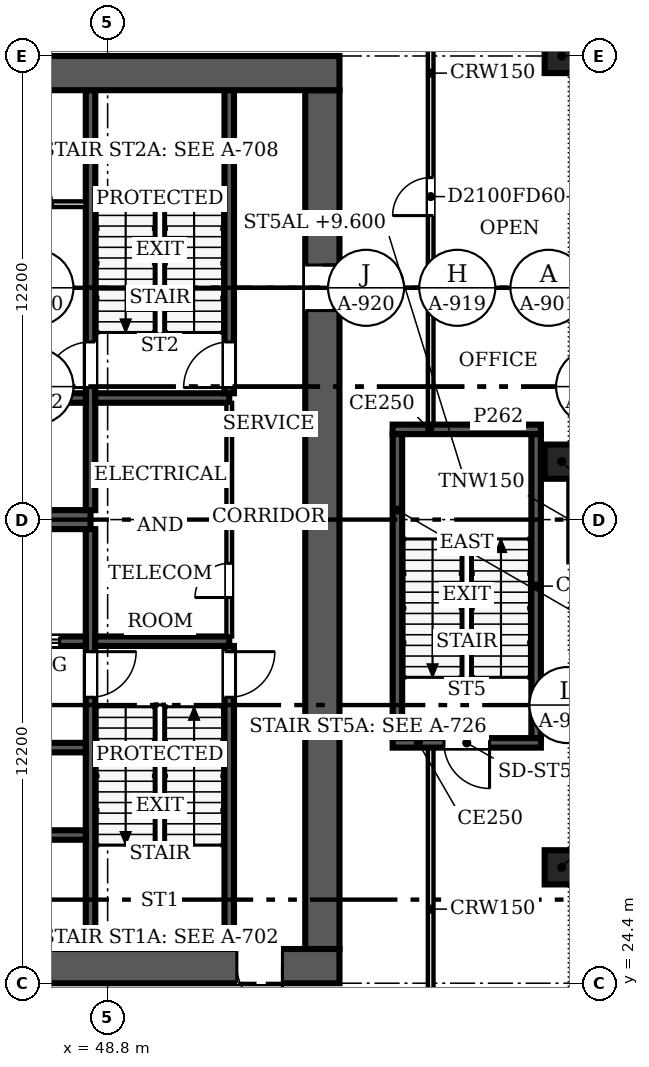
"""IFC4 building model, lengths in metres.
Left out: names, types, materials, properties, quantities, classifications, styles, units other than length and angle.
Written with IfcOpenShell. Run it as: python <this file> out.ifc"""

import sys

from ifc_helpers import new_model, si_unit, direction, frame, frame_2d, origin, origin_2d, place, context, subcontext, project, spatial, rectangle, extrude, source, transform, mapped, element, fill, save


model = new_model("IFC4")
c1 = context("Model", 3, precision=1e-05, world=origin(), true_north=direction((0.0, 1.0)))
c2 = subcontext(c1, "Body", "Model", "MODEL_VIEW")
j1 = project(units=[si_unit("LENGTHUNIT", "METRE"), si_unit("PLANEANGLEUNIT", "RADIAN")], contexts=[c1])
p1 = place(None, origin())
s1 = spatial("IfcSite", under=j1, at=p1, CompositionType="ELEMENT")
p2 = place(p1, origin())
s2 = spatial("IfcBuilding", under=s1, at=p2, CompositionType="ELEMENT")
p3 = place(p2, frame((0.0, 0.0, 7.2)))
s3 = spatial("IfcBuildingStorey", under=s2, at=p3, CompositionType="ELEMENT", Elevation=7.2)
for number, where, z_axis, x_axis in (
    (1, (60.75, 27.45, 0.0), (0.0, 0.0, 1.0), (1.0, 0.0, 0.0)),
    (2, (60.75, 38.125, 0.0), (0.0, 0.0, 1.0), (1.0, 0.0, 0.0)),
    (3, (60.75, 48.8, 0.0), (0.0, 0.0, 1.0), (1.0, 0.0, 0.0)),
):
    element("IfcColumn", number, at=place(p3, frame(where, z_axis=z_axis, x_axis=x_axis)), inside=s3, PredefinedType="COLUMN", context=c2, shape_type="SweptSolid", body=[
        extrude(rectangle(XDim=0.9, YDim=0.9, at=origin_2d()), origin(), (0.0, 0.0, 1.0), 4.55),
    ])
p4 = place(p3, frame((54.9, 24.85, 0.0), z_axis=(0.0, 0.0, 1.0), x_axis=(-1.0, 0.0, 0.0)))
e4 = element("IfcWall", 4, at=p4, inside=s3, PredefinedType="SHEAR", context=c2, shape_type="SweptSolid", body=[
    extrude(rectangle(XDim=24.4, YDim=0.9, at=frame_2d((12.2, 0.0))), origin(), (0.0, 0.0, 1.0), 4.8),
])
m1 = source(origin(), c2, "Body", "SweptSolid", [
    extrude(rectangle(XDim=1.2, YDim=2.1, at=frame_2d((0.6, 1.05))), frame((0.0, 0.46, 0.0), z_axis=(0.0, -1.0, 0.0), x_axis=(1.0, 0.0, 0.0)), (0.0, 0.0, 1.0), 0.92),
])
p5 = place(p4, frame((1.5, 0.0, 0.0)))
e5 = element("IfcOpeningElement", 5, at=p5, cuts=e4, PredefinedType="OPENING", context=c2, shape_type="MappedRepresentation", body=[
    mapped(m1, transform((0.0, 0.0, 0.0), scale=1.0)),
])
p6 = place(p3, frame((30.5, 48.35, 0.0), z_axis=(0.0, 0.0, 1.0), x_axis=(1.0, 0.0, 0.0)))
e6 = element("IfcWall", 6, at=p6, inside=s3, PredefinedType="SHEAR", context=c2, shape_type="SweptSolid", body=[
    extrude(rectangle(XDim=24.4, YDim=0.9, at=frame_2d((12.2, 0.0))), origin(), (0.0, 0.0, 1.0), 4.8),
])
p7 = place(p3, frame((54.45, 47.9, 0.0), z_axis=(0.0, 0.0, 1.0), x_axis=(0.0, -1.0, 0.0)))
e7 = element("IfcWall", 7, at=p7, inside=s3, PredefinedType="SHEAR", context=c2, shape_type="SweptSolid", body=[
    extrude(rectangle(XDim=22.6, YDim=0.9, at=frame_2d((11.3, 0.0))), origin(), (0.0, 0.0, 1.0), 4.8),
])
p8 = place(p7, frame((4.6, 0.0, 0.0)))
e8 = element("IfcOpeningElement", 8, at=p8, cuts=e7, PredefinedType="OPENING", context=c2, shape_type="MappedRepresentation", body=[
    mapped(m1, transform((0.0, 0.0, 0.0), scale=1.0)),
])
p9 = place(p3, frame((31.4, 36.6, 0.0), z_axis=(0.0, 0.0, 1.0), x_axis=(1.0, 0.0, 0.0)))
e9 = element("IfcWall", 9, at=p9, inside=s3, PredefinedType="SHEAR", context=c2, shape_type="SweptSolid", body=[
    extrude(rectangle(XDim=16.95, YDim=0.5, at=frame_2d((8.475, 0.0))), origin(), (0.0, 0.0, 1.0), 4.8),
])
p10 = place(p3, frame((48.35, 36.35, 0.0), z_axis=(0.0, 0.0, 1.0), x_axis=(0.0, -1.0, 0.0)))
e10 = element("IfcWall", 10, at=p10, inside=s3, PredefinedType="SOLIDWALL", context=c2, shape_type="SweptSolid", body=[
    extrude(rectangle(XDim=11.05, YDim=0.25, at=frame_2d((5.525, 0.0))), origin(), (0.0, 0.0, 1.0), 4.8),
])
m2 = source(origin(), c2, "Body", "SweptSolid", [
    extrude(rectangle(XDim=1.2, YDim=2.1, at=frame_2d((0.6, 1.05))), frame((0.0, 0.135, 0.0), z_axis=(0.0, -1.0, 0.0), x_axis=(1.0, 0.0, 0.0)), (0.0, 0.0, 1.0), 0.27),
])
p11 = place(p10, frame((3.225, 0.0, 0.0)))
e11 = element("IfcOpeningElement", 11, at=p11, cuts=e10, PredefinedType="OPENING", context=c2, shape_type="MappedRepresentation", body=[
    mapped(m2, transform((0.0, 0.0, 0.0), scale=1.0)),
])
p12 = place(p3, frame((48.35, 47.9, 0.0), z_axis=(0.0, 0.0, 1.0), x_axis=(0.0, -1.0, 0.0)))
e12 = element("IfcWall", 12, at=p12, inside=s3, PredefinedType="SOLIDWALL", context=c2, shape_type="SweptSolid", body=[
    extrude(rectangle(XDim=11.05, YDim=0.25, at=frame_2d((5.525, 0.0))), origin(), (0.0, 0.0, 1.0), 4.8),
])
p13 = place(p12, frame((6.625, 0.0, 0.0)))
e13 = element("IfcOpeningElement", 13, at=p13, cuts=e12, PredefinedType="OPENING", context=c2, shape_type="MappedRepresentation", body=[
    mapped(m2, transform((0.0, 0.0, 0.0), scale=1.0)),
])
p14 = place(p3, frame((48.225, 33.4, 0.0), z_axis=(0.0, 0.0, 1.0), x_axis=(-1.0, 0.0, 0.0)))
e14 = element("IfcWall", 14, at=p14, inside=s3, PredefinedType="SOLIDWALL", context=c2, shape_type="SweptSolid", body=[
    extrude(rectangle(XDim=5.275, YDim=0.25, at=frame_2d((2.638, 0.0))), origin(), (0.0, 0.0, 1.0), 4.8),
])
p15 = place(p14, frame((3.512, 0.0, 0.0)))
e15 = element("IfcOpeningElement", 15, at=p15, cuts=e14, PredefinedType="OPENING", context=c2, shape_type="MappedRepresentation", body=[
    mapped(m2, transform((0.0, 0.0, 0.0), scale=1.0)),
])
p16 = place(p14, frame((0.688, 0.0, 0.0)))
e16 = element("IfcOpeningElement", 16, at=p16, cuts=e14, PredefinedType="OPENING", context=c2, shape_type="MappedRepresentation", body=[
    mapped(m2, transform((0.0, 0.0, 0.0), scale=1.0)),
])
p17 = place(p3, frame((48.475, 33.4, 0.0), z_axis=(0.0, 0.0, 1.0), x_axis=(1.0, 0.0, 0.0)))
e17 = element("IfcWall", 17, at=p17, inside=s3, PredefinedType="SOLIDWALL", context=c2, shape_type="SweptSolid", body=[
    extrude(rectangle(XDim=3.525, YDim=0.25, at=frame_2d((1.762, 0.0))), origin(), (0.0, 0.0, 1.0), 4.8),
])
for number, where, z_axis, x_axis in (
    (18, (42.95, 28.3, 0.0), (0.0, 0.0, 1.0), (1.0, 0.0, 0.0)),
    (19, (42.95, 39.8, 0.0), (0.0, 0.0, 1.0), (1.0, 0.0, 0.0)),
):
    element("IfcWall", number, at=place(p3, frame(where, z_axis=z_axis, x_axis=x_axis)), inside=s3, PredefinedType="SOLIDWALL", context=c2, shape_type="SweptSolid", body=[
        extrude(rectangle(XDim=5.275, YDim=0.25, at=frame_2d((2.638, 0.0))), origin(), (0.0, 0.0, 1.0), 4.8),
    ])
p18 = place(p3, frame((48.475, 39.8, 0.0), z_axis=(0.0, 0.0, 1.0), x_axis=(1.0, 0.0, 0.0)))
e20 = element("IfcWall", 20, at=p18, inside=s3, PredefinedType="SOLIDWALL", context=c2, shape_type="SweptSolid", body=[
    extrude(rectangle(XDim=3.525, YDim=0.25, at=frame_2d((1.762, 0.0))), origin(), (0.0, 0.0, 1.0), 4.8),
])
p19 = place(p3, frame((52.0, 25.3, 0.0), z_axis=(0.0, 0.0, 1.0), x_axis=(0.0, 1.0, 0.0)))
e21 = element("IfcWall", 21, at=p19, inside=s3, PredefinedType="SOLIDWALL", context=c2, shape_type="SweptSolid", body=[
    extrude(rectangle(XDim=7.975, YDim=0.25, at=frame_2d((3.987, 0.0))), origin(), (0.0, 0.0, 1.0), 4.8),
])
p20 = place(p19, frame((6.625, 0.0, 0.0)))
e22 = element("IfcOpeningElement", 22, at=p20, cuts=e21, PredefinedType="OPENING", context=c2, shape_type="MappedRepresentation", body=[
    mapped(m2, transform((0.0, 0.0, 0.0), scale=1.0)),
])
p21 = place(p3, frame((52.0, 39.925, 0.0), z_axis=(0.0, 0.0, 1.0), x_axis=(0.0, 1.0, 0.0)))
e23 = element("IfcWall", 23, at=p21, inside=s3, PredefinedType="SOLIDWALL", context=c2, shape_type="SweptSolid", body=[
    extrude(rectangle(XDim=7.975, YDim=0.25, at=frame_2d((3.987, 0.0))), origin(), (0.0, 0.0, 1.0), 4.8),
])
p22 = place(p21, frame((0.15, 0.0, 0.0)))
e24 = element("IfcOpeningElement", 24, at=p22, cuts=e23, PredefinedType="OPENING", context=c2, shape_type="MappedRepresentation", body=[
    mapped(m2, transform((0.0, 0.0, 0.0), scale=1.0)),
])
p23 = place(p3, frame((42.95, 30.6, 0.0), z_axis=(0.0, 0.0, 1.0), x_axis=(1.0, 0.0, 0.0)))
e25 = element("IfcWall", 25, at=p23, inside=s3, PredefinedType="SOLIDWALL", context=c2, shape_type="SweptSolid", body=[
    extrude(rectangle(XDim=5.275, YDim=0.25, at=frame_2d((2.638, 0.0))), origin(), (0.0, 0.0, 1.0), 4.8),
])
p24 = place(p3, frame((52.0, 33.525, 0.0), z_axis=(0.0, 0.0, 1.0), x_axis=(0.0, 1.0, 0.0)))
e26 = element("IfcWall", 26, at=p24, inside=s3, PredefinedType="PARTITIONING", context=c2, shape_type="SweptSolid", body=[
    extrude(rectangle(XDim=6.15, YDim=0.15, at=frame_2d((3.075, 0.0))), origin(), (0.0, 0.0, 1.0), 4.55),
])
m3 = source(origin(), c2, "Body", "SweptSolid", [
    extrude(rectangle(XDim=0.9, YDim=2.1, at=frame_2d((0.45, 1.05))), frame((0.0, 0.085, 0.0), z_axis=(0.0, -1.0, 0.0), x_axis=(1.0, 0.0, 0.0)), (0.0, 0.0, 1.0), 0.17),
])
p25 = place(p24, frame((1.025, 0.0, 0.0)))
e27 = element("IfcOpeningElement", 27, at=p25, cuts=e26, PredefinedType="OPENING", context=c2, shape_type="MappedRepresentation", body=[
    mapped(m3, transform((0.0, 0.0, 0.0), scale=1.0)),
])
p26 = place(p3, frame((45.65, 44.9, 0.0), z_axis=(0.0, 0.0, 1.0), x_axis=(1.0, 0.0, 0.0)))
e28 = element("IfcWall", 28, at=p26, inside=s3, PredefinedType="PARTITIONING", context=c2, shape_type="SweptSolid", body=[
    extrude(rectangle(XDim=2.575, YDim=0.15, at=frame_2d((1.288, 0.0))), origin(), (0.0, 0.0, 1.0), 4.55),
])
p27 = place(p26, frame((0.8, 0.0, 0.0)))
e29 = element("IfcOpeningElement", 29, at=p27, cuts=e28, PredefinedType="OPENING", context=c2, shape_type="MappedRepresentation", body=[
    mapped(m3, transform((0.0, 0.0, 0.0), scale=1.0)),
])
p28 = place(p3, frame((60.2, 30.725, 0.0), z_axis=(0.0, 0.0, 1.0), x_axis=(-1.0, 0.0, 0.0)))
e30 = element("IfcWall", 30, at=p28, inside=s3, PredefinedType="SOLIDWALL", context=c2, shape_type="SweptSolid", body=[
    extrude(rectangle(XDim=3.9, YDim=0.25, at=frame_2d((1.95, 0.0))), origin(), (0.0, 0.0, 1.0), 4.8),
])
p29 = place(p28, frame((1.35, 0.0, 0.0)))
e31 = element("IfcOpeningElement", 31, at=p29, cuts=e30, PredefinedType="OPENING", context=c2, shape_type="MappedRepresentation", body=[
    mapped(m2, transform((0.0, 0.0, 0.0), scale=1.0)),
])
p30 = place(p3, frame((56.425, 30.85, 0.0), z_axis=(0.0, 0.0, 1.0), x_axis=(0.0, 1.0, 0.0)))
e32 = element("IfcWall", 32, at=p30, inside=s3, PredefinedType="SOLIDWALL", context=c2, shape_type="SweptSolid", body=[
    extrude(rectangle(XDim=8.0, YDim=0.25, at=frame_2d((4.0, 0.0))), origin(), (0.0, 0.0, 1.0), 4.8),
])
p31 = place(p3, frame((56.3, 38.975, 0.0), z_axis=(0.0, 0.0, 1.0), x_axis=(1.0, 0.0, 0.0)))
e33 = element("IfcWall", 33, at=p31, inside=s3, PredefinedType="SOLIDWALL", context=c2, shape_type="SweptSolid", body=[
    extrude(rectangle(XDim=3.9, YDim=0.25, at=frame_2d((1.95, 0.0))), origin(), (0.0, 0.0, 1.0), 4.8),
])
p32 = place(p3, frame((60.075, 38.85, 0.0), z_axis=(0.0, 0.0, 1.0), x_axis=(0.0, -1.0, 0.0)))
e34 = element("IfcWall", 34, at=p32, inside=s3, PredefinedType="SOLIDWALL", context=c2, shape_type="SweptSolid", body=[
    extrude(rectangle(XDim=8.0, YDim=0.25, at=frame_2d((4.0, 0.0))), origin(), (0.0, 0.0, 1.0), 4.8),
])
p33 = place(p3, frame((57.3, 22.101, 0.0), z_axis=(0.0, 0.0, 1.0), x_axis=(0.0, 1.0, 0.0)))
e35 = element("IfcWall", 35, at=p33, inside=s3, PredefinedType="PARTITIONING", context=c2, shape_type="SweptSolid", body=[
    extrude(rectangle(XDim=8.499, YDim=0.15, at=frame_2d((4.25, 0.0))), origin(), (0.0, 0.0, 1.0), 3.715),
])
p34 = place(p3, frame((61.0, 23.62, 0.0), z_axis=(0.0, 0.0, 1.0), x_axis=(0.0, 1.0, 0.0)))
e36 = element("IfcWall", 36, at=p34, inside=s3, PredefinedType="PARTITIONING", context=c2, shape_type="SweptSolid", body=[
    extrude(rectangle(XDim=3.379, YDim=0.15, at=frame_2d((1.689, 0.0))), origin(), (0.0, 0.0, 1.0), 3.715),
])
p35 = place(p3, frame((61.0, 27.901, 0.0), z_axis=(0.0, 0.0, 1.0), x_axis=(0.0, 1.0, 0.0)))
e37 = element("IfcWall", 37, at=p35, inside=s3, PredefinedType="PARTITIONING", context=c2, shape_type="SweptSolid", body=[
    extrude(rectangle(XDim=5.023, YDim=0.15, at=frame_2d((2.512, 0.0))), origin(), (0.0, 0.0, 1.0), 3.715),
])
p36 = place(p3, frame((61.0, 33.076, 0.0), z_axis=(0.0, 0.0, 1.0), x_axis=(0.0, 1.0, 0.0)))
e38 = element("IfcWall", 38, at=p36, inside=s3, PredefinedType="PARTITIONING", context=c2, shape_type="SweptSolid", body=[
    extrude(rectangle(XDim=2.248, YDim=0.15, at=frame_2d((1.124, 0.0))), origin(), (0.0, 0.0, 1.0), 3.715),
])
p37 = place(p3, frame((61.0, 35.476, 0.0), z_axis=(0.0, 0.0, 1.0), x_axis=(0.0, 1.0, 0.0)))
e39 = element("IfcWall", 39, at=p37, inside=s3, PredefinedType="PARTITIONING", context=c2, shape_type="SweptSolid", body=[
    extrude(rectangle(XDim=2.198, YDim=0.15, at=frame_2d((1.099, 0.0))), origin(), (0.0, 0.0, 1.0), 3.715),
])
p38 = place(p3, frame((61.0, 38.576, 0.0), z_axis=(0.0, 0.0, 1.0), x_axis=(0.0, 1.0, 0.0)))
e40 = element("IfcWall", 40, at=p38, inside=s3, PredefinedType="PARTITIONING", context=c2, shape_type="SweptSolid", body=[
    extrude(rectangle(XDim=9.773, YDim=0.15, at=frame_2d((4.887, 0.0))), origin(), (0.0, 0.0, 1.0), 3.715),
])
p39 = place(p3, frame((57.3, 51.099, 0.0), z_axis=(0.0, 0.0, 1.0), x_axis=(0.0, -1.0, 0.0)))
e41 = element("IfcWall", 41, at=p39, inside=s3, PredefinedType="PARTITIONING", context=c2, shape_type="SweptSolid", body=[
    extrude(rectangle(XDim=11.999, YDim=0.15, at=frame_2d((6.0, 0.0))), origin(), (0.0, 0.0, 1.0), 3.715),
])
m4 = source(origin(), c2, "Body", "SweptSolid", [
    extrude(rectangle(XDim=1.0, YDim=2.1, at=frame_2d((0.5, 1.05))), frame((0.0, 0.085, 0.0), z_axis=(0.0, -1.0, 0.0), x_axis=(1.0, 0.0, 0.0)), (0.0, 0.0, 1.0), 0.17),
])
p40 = place(p39, frame((5.499, 0.0, 0.0)))
e42 = element("IfcOpeningElement", 42, at=p40, cuts=e41, PredefinedType="OPENING", context=c2, shape_type="MappedRepresentation", body=[
    mapped(m4, transform((0.0, 0.0, 0.0), scale=1.0)),
])
m5 = source(origin(), c2, "Body", "SweptSolid", [
    extrude(rectangle(XDim=1.2, YDim=2.1, at=frame_2d((0.6, 1.05))), frame((0.0, 0.025, 0.0), z_axis=(0.0, -1.0, 0.0), x_axis=(1.0, 0.0, 0.0)), (0.0, 0.0, 1.0), 0.05),
])
p41 = place(p5, origin())
e43 = element("IfcDoor", 43, at=p41, inside=s3, OperationType="SINGLE_SWING_LEFT", PredefinedType="DOOR", context=c2, shape_type="MappedRepresentation", body=[
    mapped(m5, transform((0.0, 0.0, 0.0), scale=1.0)),
])
fill(e5, e43)
p42 = place(p8, origin())
e44 = element("IfcDoor", 44, at=p42, inside=s3, OperationType="SINGLE_SWING_LEFT", PredefinedType="DOOR", context=c2, shape_type="MappedRepresentation", body=[
    mapped(m5, transform((0.0, 0.0, 0.0), scale=1.0)),
])
fill(e8, e44)
p43 = place(p11, origin())
e45 = element("IfcDoor", 45, at=p43, inside=s3, OperationType="SINGLE_SWING_LEFT", PredefinedType="DOOR", context=c2, shape_type="MappedRepresentation", body=[
    mapped(m5, transform((0.0, 0.0, 0.0), scale=1.0)),
])
fill(e11, e45)
p44 = place(p13, origin())
e46 = element("IfcDoor", 46, at=p44, inside=s3, OperationType="SINGLE_SWING_RIGHT", PredefinedType="DOOR", context=c2, shape_type="MappedRepresentation", body=[
    mapped(m5, transform((0.0, 0.0, 0.0), scale=1.0)),
])
fill(e13, e46)
p45 = place(p16, origin())
e47 = element("IfcDoor", 47, at=p45, inside=s3, OperationType="DOUBLE_DOOR_SLIDING", PredefinedType="DOOR", context=c2, shape_type="MappedRepresentation", body=[
    mapped(m5, transform((0.0, 0.0, 0.0), scale=1.0)),
])
fill(e16, e47)
p46 = place(p20, origin())
e48 = element("IfcDoor", 48, at=p46, inside=s3, OperationType="SINGLE_SWING_RIGHT", PredefinedType="DOOR", context=c2, shape_type="MappedRepresentation", body=[
    mapped(m5, transform((0.0, 0.0, 0.0), scale=1.0)),
])
fill(e22, e48)
p47 = place(p22, origin())
e49 = element("IfcDoor", 49, at=p47, inside=s3, OperationType="SINGLE_SWING_LEFT", PredefinedType="DOOR", context=c2, shape_type="MappedRepresentation", body=[
    mapped(m5, transform((0.0, 0.0, 0.0), scale=1.0)),
])
fill(e24, e49)
m6 = source(origin(), c2, "Body", "SweptSolid", [
    extrude(rectangle(XDim=0.9, YDim=2.1, at=frame_2d((0.45, 1.05))), frame((0.0, 0.025, 0.0), z_axis=(0.0, -1.0, 0.0), x_axis=(1.0, 0.0, 0.0)), (0.0, 0.0, 1.0), 0.05),
])
p48 = place(p25, origin())
e50 = element("IfcDoor", 50, at=p48, inside=s3, OperationType="SINGLE_SWING_LEFT", PredefinedType="DOOR", context=c2, shape_type="MappedRepresentation", body=[
    mapped(m6, transform((0.0, 0.0, 0.0), scale=1.0)),
])
fill(e27, e50)
p49 = place(p29, origin())
e51 = element("IfcDoor", 51, at=p49, inside=s3, OperationType="SINGLE_SWING_LEFT", PredefinedType="DOOR", context=c2, shape_type="MappedRepresentation", body=[
    mapped(m5, transform((0.0, 0.0, 0.0), scale=1.0)),
])
fill(e31, e51)
m7 = source(origin(), c2, "Body", "SweptSolid", [
    extrude(rectangle(XDim=1.0, YDim=2.1, at=frame_2d((0.5, 1.05))), frame((0.0, 0.025, 0.0), z_axis=(0.0, -1.0, 0.0), x_axis=(1.0, 0.0, 0.0)), (0.0, 0.0, 1.0), 0.05),
])
p50 = place(p40, origin())
e52 = element("IfcDoor", 52, at=p50, inside=s3, OperationType="SINGLE_SWING_RIGHT", PredefinedType="DOOR", context=c2, shape_type="MappedRepresentation", body=[
    mapped(m7, transform((0.0, 0.0, 0.0), scale=1.0)),
])
fill(e42, e52)
save(model, sys.argv[1])
